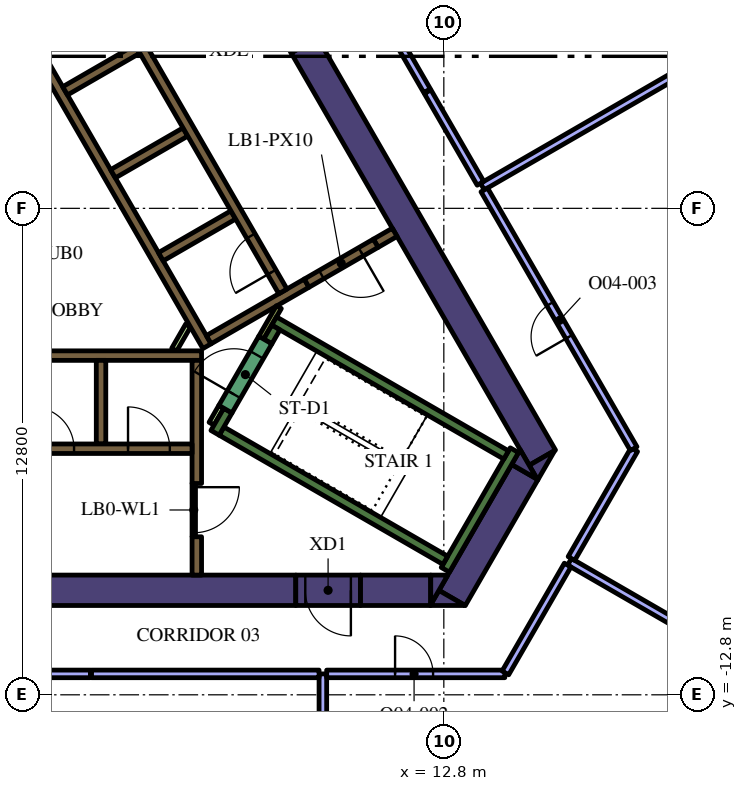
"""IFC4 building model, lengths in metres.
Left out: names, types, materials, properties, quantities, classifications, styles, units other than length and angle.
Written with IfcOpenShell. Run it as: python <this file> out.ifc"""

import sys

from ifc_helpers import new_model, si_unit, direction, frame, frame_2d, origin, place, context, subcontext, project, spatial, polyline, rectangle, outline, extrude, element, fill, save


model = new_model("IFC4")
c1 = context("Model", 3, precision=1e-05, world=origin(), true_north=direction((0.0, 1.0)))
c2 = subcontext(c1, "Body", "Model", "MODEL_VIEW")
j1 = project(units=[si_unit("LENGTHUNIT", "METRE"), si_unit("PLANEANGLEUNIT", "RADIAN")], contexts=[c1])
p1 = place(None, origin())
s1 = spatial("IfcSite", under=j1, at=p1, CompositionType="ELEMENT")
p2 = place(p1, origin())
s2 = spatial("IfcBuilding", under=s1, at=p2, CompositionType="ELEMENT")
p3 = place(p2, frame((0.0, 0.0, 187.8)))
s3 = spatial("IfcBuildingStorey", under=s2, at=p3, CompositionType="ELEMENT", Elevation=187.8)
p4 = place(p3, frame((9.129, 4.289, 0.0), z_axis=(0.0, 0.0, 1.0), x_axis=(0.499995742806, -0.866027861663, 0.0)))
e1 = element("IfcWall", 1, at=p4, inside=s3, PredefinedType="SOLIDWALL", context=c2, shape_type="SweptSolid", body=[
    extrude(rectangle(XDim=12.527, YDim=0.8, at=frame_2d((6.264, 0.0))), origin(), (0.0, 0.0, 1.0), 4.2),
])
p5 = place(p3, origin())
e2 = element("IfcWall", 2, at=p5, inside=s3, PredefinedType="SOLIDWALL", context=c2, shape_type="SweptSolid", body=[
    extrude(outline(polyline([(15.271, -7.15), (15.047, -6.762), (15.719, -6.374), (15.271, -7.15)])), origin(), (0.0, 0.0, 1.0), 4.2),
])
p6 = place(p3, frame((13.018, -10.252, 0.0), z_axis=(0.0, 0.0, 1.0), x_axis=(0.499984020225, 0.866034629516, 0.0)))
e3 = element("IfcWall", 3, at=p6, inside=s3, PredefinedType="SOLIDWALL", context=c2, shape_type="SweptSolid", body=[
    extrude(rectangle(XDim=3.824, YDim=0.8, at=frame_2d((1.912, 0.0))), origin(), (0.0, 0.0, 1.0), 4.2),
])
e4 = element("IfcWall", 4, at=p5, inside=s3, PredefinedType="SOLIDWALL", context=c2, shape_type="SweptSolid", body=[
    extrude(outline(polyline([(12.671, -10.053), (13.358, -10.45), (12.442, -10.45), (12.671, -10.053)])), origin(), (0.0, 0.0, 1.0), 4.2),
])
e5 = element("IfcWall", 5, at=p5, inside=s3, PredefinedType="SOLIDWALL", context=c2, shape_type="SweptSolid", body=[
    extrude(outline(polyline([(14.809, -6.35), (15.257, -7.126), (14.585, -6.738), (14.809, -6.35)])), origin(), (0.0, 0.0, 1.0), 4.2),
])
p7 = place(p3, frame((10.604, -10.05, 0.0), z_axis=(0.0, 0.0, 1.0), x_axis=(1.0, 0.0, 0.0)))
e6 = element("IfcWall", 6, at=p7, inside=s3, PredefinedType="SOLIDWALL", context=c2, shape_type="SweptSolid", body=[
    extrude(rectangle(XDim=1.849, YDim=0.8, at=frame_2d((0.925, 0.0))), origin(), (0.0, 0.0, 1.0), 4.2),
])
e7 = element("IfcWall", 7, at=p5, inside=s3, PredefinedType="SOLIDWALL", context=c2, shape_type="SweptSolid", body=[
    extrude(outline(polyline([(12.904, -9.65), (12.456, -10.426), (12.456, -9.65), (12.904, -9.65)])), origin(), (0.0, 0.0, 1.0), 4.2),
])
p8 = place(p3, frame((-13.378, -10.05, 0.0), z_axis=(0.0, 0.0, 1.0), x_axis=(1.0, 0.0, 0.0)))
e8 = element("IfcWall", 8, at=p8, inside=s3, PredefinedType="SOLIDWALL", context=c2, shape_type="SweptSolid", body=[
    extrude(rectangle(XDim=22.282, YDim=0.8, at=frame_2d((11.141, 0.0))), origin(), (0.0, 0.0, 1.0), 4.2),
])
p9 = place(p3, frame((12.84, -9.511, 0.0), z_axis=(0.0, 0.0, 1.0), x_axis=(0.499997733992, 0.866026712061, 0.0)))
e9 = element("IfcWall", 9, at=p9, inside=s3, PredefinedType="SOLIDWALL", context=c2, shape_type="SweptSolid", body=[
    extrude(rectangle(XDim=3.634, YDim=0.25, at=frame_2d((1.817, 0.0))), origin(), (0.0, 0.0, 1.0), 4.2),
])
p10 = place(p3, frame((12.84, -9.261, 0.0), z_axis=(0.0, 0.0, 1.0), x_axis=(-0.866013990052, 0.500019768644, 0.0)))
e10 = element("IfcWall", 10, at=p10, inside=s3, PredefinedType="SOLIDWALL", context=c2, shape_type="SweptSolid", body=[
    extrude(rectangle(XDim=6.8, YDim=0.25, at=frame_2d((3.4, 0.0))), origin(), (0.0, 0.0, 1.0), 4.2),
])
p11 = place(p3, frame((6.78, -5.906, 0.0), z_axis=(0.0, 0.0, 1.0), x_axis=(0.500223362819, 0.865896406789, 0.0)))
e11 = element("IfcWall", 11, at=p11, inside=s3, PredefinedType="SOLIDWALL", context=c2, shape_type="SweptSolid", body=[
    extrude(rectangle(XDim=0.675, YDim=0.25, at=frame_2d((0.337, 0.0))), origin(), (0.0, 0.0, 1.0), 4.2),
])
p12 = place(p3, frame((8.334, -2.964, 0.0), z_axis=(0.0, 0.0, 1.0), x_axis=(0.866016039709, -0.500016218704, 0.0)))
e12 = element("IfcWall", 12, at=p12, inside=s3, PredefinedType="SOLIDWALL", context=c2, shape_type="SweptSolid", body=[
    extrude(rectangle(XDim=7.05, YDim=0.25, at=frame_2d((3.525, 0.0))), origin(), (0.0, 0.0, 1.0), 4.2),
])
p13 = place(p3, frame((8.168, -3.503, 0.0), z_axis=(0.0, 0.0, 1.0), x_axis=(0.49972245349, 0.866185586049, 0.0)))
e13 = element("IfcWall", 13, at=p13, inside=s3, PredefinedType="SOLIDWALL", context=c2, shape_type="SweptSolid", body=[
    extrude(rectangle(XDim=0.425, YDim=0.25, at=frame_2d((0.212, 0.0))), origin(), (0.0, 0.0, 1.0), 4.2),
])
p14 = place(p3, frame((-5.545, -3.875, 0.0), z_axis=(0.0, 0.0, 1.0), x_axis=(1.0, 0.0, 0.0)))
e14 = element("IfcWall", 14, at=p14, inside=s3, PredefinedType="SOLIDWALL", context=c2, shape_type="SweptSolid", body=[
    extrude(rectangle(XDim=11.97, YDim=0.25, at=frame_2d((5.985, 0.0))), origin(), (0.0, 0.0, 1.0), 4.2),
])
p15 = place(p3, frame((6.3, -7.24, 0.0), z_axis=(0.0, 0.0, 1.0), x_axis=(0.0, 1.0, 0.0)))
e15 = element("IfcWall", 15, at=p15, inside=s3, PredefinedType="SOLIDWALL", context=c2, shape_type="SweptSolid", body=[
    extrude(rectangle(XDim=3.24, YDim=0.25, at=frame_2d((1.62, 0.0))), origin(), (0.0, 0.0, 1.0), 4.2),
])
p16 = place(p3, frame((6.3, -9.65, 0.0), z_axis=(0.0, 0.0, 1.0), x_axis=(0.0, 1.0, 0.0)))
e16 = element("IfcWall", 16, at=p16, inside=s3, PredefinedType="SOLIDWALL", context=c2, shape_type="SweptSolid", body=[
    extrude(rectangle(XDim=1.008, YDim=0.25, at=frame_2d((0.504, 0.0))), origin(), (0.0, 0.0, 1.0), 4.2),
])
p17 = place(p3, frame((3.78, -4.0, 0.0), z_axis=(0.0, 0.0, 1.0), x_axis=(0.0, -1.0, 0.0)))
e17 = element("IfcWall", 17, at=p17, inside=s3, PredefinedType="SOLIDWALL", context=c2, shape_type="SweptSolid", body=[
    extrude(rectangle(XDim=2.2, YDim=0.25, at=frame_2d((1.1, 0.0))), origin(), (0.0, 0.0, 1.0), 4.2),
])
p18 = place(p3, frame((11.507, -0.631, 0.0), z_axis=(0.0, 0.0, 1.0), x_axis=(-0.866093731455, -0.499881634324, 0.0)))
e18 = element("IfcWall", 18, at=p18, inside=s3, PredefinedType="SOLIDWALL", context=c2, shape_type="SweptSolid", body=[
    extrude(rectangle(XDim=0.575, YDim=0.25, at=frame_2d((0.288, 0.0))), origin(), (0.0, 0.0, 1.0), 4.2),
])
p19 = place(p3, frame((6.568, -3.627, 0.0), z_axis=(0.0, 0.0, 1.0), x_axis=(-0.499999455981, 0.866025717874, 0.0)))
e19 = element("IfcWall", 19, at=p19, inside=s3, PredefinedType="SOLIDWALL", context=c2, shape_type="SweptSolid", body=[
    extrude(rectangle(XDim=11.978, YDim=0.25, at=frame_2d((5.989, 0.0))), origin(), (0.0, 0.0, 1.0), 4.2),
])
for number, where, z_axis, x_axis in (
    (20, (2.834, 3.091, 0.0), (0.0, 0.0, 1.0), (0.866, 0.5, 0.0)),
    (21, (4.094, 0.909, 0.0), (0.0, 0.0, 1.0), (0.866, 0.5, 0.0)),
    (22, (5.354, -1.274, 0.0), (0.0, 0.0, 1.0), (0.866, 0.5, 0.0)),
):
    element("IfcWall", number, at=place(p3, frame(where, z_axis=z_axis, x_axis=x_axis)), inside=s3, PredefinedType="SOLIDWALL", context=c2, shape_type="SweptSolid", body=[
        extrude(rectangle(XDim=2.2, YDim=0.25, at=frame_2d((1.1, 0.0))), origin(), (0.0, 0.0, 1.0), 4.2),
    ])
p20 = place(p3, frame((6.614, -3.456, 0.0), z_axis=(0.0, 0.0, 1.0), x_axis=(0.866032512851, 0.499987686533, 0.0)))
e23 = element("IfcWall", 23, at=p20, inside=s3, PredefinedType="SOLIDWALL", context=c2, shape_type="SweptSolid", body=[
    extrude(rectangle(XDim=2.975, YDim=0.25, at=frame_2d((1.487, 0.0))), origin(), (0.0, 0.0, 1.0), 4.2),
])
p21 = place(p3, frame((6.945, -5.222, 0.0), z_axis=(0.0, 0.0, 1.0), x_axis=(-0.499818422106, -0.866130212453, 0.0)))
e24 = element("IfcWall", 24, at=p21, inside=s3, PredefinedType="PARTITIONING", context=c2, shape_type="SweptSolid", body=[
    extrude(rectangle(XDim=0.514, YDim=0.15, at=frame_2d((0.257, 0.0))), origin(), (0.0, 0.0, 1.0), 3.15),
])
p22 = place(p3, frame((8.459, -2.599, 0.0), z_axis=(0.0, 0.0, 1.0), x_axis=(-0.500041054325, -0.866001699761, 0.0)))
e25 = element("IfcWall", 25, at=p22, inside=s3, PredefinedType="PARTITIONING", context=c2, shape_type="SweptSolid", body=[
    extrude(rectangle(XDim=0.929, YDim=0.15, at=frame_2d((0.464, 0.0))), origin(), (0.0, 0.0, 1.0), 4.2),
])
p23 = place(p3, frame((5.705, -3.718, 0.0), z_axis=(0.0, 0.0, 1.0), x_axis=(0.499962090823, 0.866047289552, 0.0)))
e26 = element("IfcWall", 26, at=p23, inside=s3, PredefinedType="PARTITIONING", context=c2, shape_type="SweptSolid", body=[
    extrude(rectangle(XDim=0.735, YDim=0.15, at=frame_2d((0.367, 0.0))), origin(), (0.0, 0.0, 1.0), 3.15),
])
p24 = place(p3, frame((-6.175, -6.325, 0.0), z_axis=(0.0, 0.0, 1.0), x_axis=(1.0, 0.0, 0.0)))
e27 = element("IfcWall", 27, at=p24, inside=s3, PredefinedType="SOLIDWALL", context=c2, shape_type="SweptSolid", body=[
    extrude(rectangle(XDim=12.35, YDim=0.25, at=frame_2d((6.175, 0.0))), origin(), (0.0, 0.0, 1.0), 4.2),
])
p25 = place(p24, frame((0.585, 0.0, 0.0)))
e28 = element("IfcOpeningElement", 28, at=p25, cuts=e27, PredefinedType="OPENING", context=c2, shape_type="SweptSolid", body=[
    extrude(rectangle(XDim=1.1, YDim=2.1, at=frame_2d((0.55, 1.05))), frame((0.0, 0.135, 0.0), z_axis=(0.0, -1.0, 0.0), x_axis=(1.0, 0.0, 0.0)), (0.0, 0.0, 1.0), 0.27),
])
p26 = place(p24, frame((3.105, 0.0, 0.0)))
e29 = element("IfcOpeningElement", 29, at=p26, cuts=e27, PredefinedType="OPENING", context=c2, shape_type="SweptSolid", body=[
    extrude(rectangle(XDim=1.1, YDim=2.1, at=frame_2d((0.55, 1.05))), frame((0.0, 0.135, 0.0), z_axis=(0.0, -1.0, 0.0), x_axis=(1.0, 0.0, 0.0)), (0.0, 0.0, 1.0), 0.27),
])
p27 = place(p24, frame((5.625, 0.0, 0.0)))
e30 = element("IfcOpeningElement", 30, at=p27, cuts=e27, PredefinedType="OPENING", context=c2, shape_type="SweptSolid", body=[
    extrude(rectangle(XDim=1.1, YDim=2.1, at=frame_2d((0.55, 1.05))), frame((0.0, 0.135, 0.0), z_axis=(0.0, -1.0, 0.0), x_axis=(1.0, 0.0, 0.0)), (0.0, 0.0, 1.0), 0.27),
])
p28 = place(p24, frame((8.145, 0.0, 0.0)))
e31 = element("IfcOpeningElement", 31, at=p28, cuts=e27, PredefinedType="OPENING", context=c2, shape_type="SweptSolid", body=[
    extrude(rectangle(XDim=1.1, YDim=2.1, at=frame_2d((0.55, 1.05))), frame((0.0, 0.135, 0.0), z_axis=(0.0, -1.0, 0.0), x_axis=(1.0, 0.0, 0.0)), (0.0, 0.0, 1.0), 0.27),
])
p29 = place(p24, frame((10.665, 0.0, 0.0)))
e32 = element("IfcOpeningElement", 32, at=p29, cuts=e27, PredefinedType="OPENING", context=c2, shape_type="SweptSolid", body=[
    extrude(rectangle(XDim=1.1, YDim=2.1, at=frame_2d((0.55, 1.05))), frame((0.0, 0.135, 0.0), z_axis=(0.0, -1.0, 0.0), x_axis=(1.0, 0.0, 0.0)), (0.0, 0.0, 1.0), 0.27),
])
p30 = place(p3, frame((8.565, -2.185, 0.0), z_axis=(0.0, 0.0, 1.0), x_axis=(-0.499997954832, 0.866026584559, 0.0)))
e33 = element("IfcWall", 33, at=p30, inside=s3, PredefinedType="SOLIDWALL", context=c2, shape_type="SweptSolid", body=[
    extrude(rectangle(XDim=12.35, YDim=0.25, at=frame_2d((6.175, 0.0))), origin(), (0.0, 0.0, 1.0), 4.2),
])
p31 = place(p30, frame((0.585, 0.0, 0.0)))
e34 = element("IfcOpeningElement", 34, at=p31, cuts=e33, PredefinedType="OPENING", context=c2, shape_type="SweptSolid", body=[
    extrude(rectangle(XDim=1.1, YDim=2.1, at=frame_2d((0.55, 1.05))), frame((0.0, 0.135, 0.0), z_axis=(0.0, -1.0, 0.0), x_axis=(1.0, 0.0, 0.0)), (0.0, 0.0, 1.0), 0.27),
])
p32 = place(p3, frame((7.053, -5.284, 0.0), z_axis=(0.0, 0.0, 1.0), x_axis=(0.500078061341, 0.865980330357, 0.0)))
e35 = element("IfcWall", 35, at=p32, inside=s3, PredefinedType="SOLIDWALL", context=c2, shape_type="SweptSolid", body=[
    extrude(rectangle(XDim=2.1, YDim=0.4, at=frame_2d((1.05, 0.0))), origin(), (0.0, 0.0, 1.0), 4.2),
])
p33 = place(p32, frame((0.45, 0.0, 0.0)))
e36 = element("IfcOpeningElement", 36, at=p33, cuts=e35, PredefinedType="OPENING", context=c2, shape_type="SweptSolid", body=[
    extrude(rectangle(XDim=1.2, YDim=2.1, at=frame_2d((0.6, 1.05))), frame((0.0, 0.21, 0.0), z_axis=(0.0, -1.0, 0.0), x_axis=(1.0, 0.0, 0.0)), (0.0, 0.0, 1.0), 0.42),
])
p34 = place(p3, frame((6.22, -7.237, 0.0), z_axis=(0.0, 0.0, 1.0), x_axis=(0.0, -1.0, 0.0)))
e37 = element("IfcWall", 37, at=p34, inside=s3, PredefinedType="PARTITIONING", context=c2, shape_type="SweptSolid", body=[
    extrude(rectangle(XDim=1.4, YDim=0.09, at=frame_2d((0.7, 0.0))), origin(), (0.0, 0.0, 1.0), 3.15),
])
p35 = place(p34, frame((0.1, 0.0, 0.0)))
e38 = element("IfcOpeningElement", 38, at=p35, cuts=e37, PredefinedType="OPENING", context=c2, shape_type="SweptSolid", body=[
    extrude(rectangle(XDim=1.2, YDim=2.1, at=frame_2d((0.6, 1.05))), frame((0.0, 0.055, 0.0), z_axis=(0.0, -1.0, 0.0), x_axis=(1.0, 0.0, 0.0)), (0.0, 0.0, 1.0), 0.11),
])
p36 = place(p3, frame((11.009, -0.919, 0.0), z_axis=(0.0, 0.0, 1.0), x_axis=(-0.866059744384, -0.49994051562, 0.0)))
e39 = element("IfcWall", 39, at=p36, inside=s3, PredefinedType="SOLIDWALL", context=c2, shape_type="SweptSolid", body=[
    extrude(rectangle(XDim=2.1, YDim=0.25, at=frame_2d((1.05, 0.0))), origin(), (0.0, 0.0, 1.0), 4.2),
])
p37 = place(p36, frame((0.45, 0.0, 0.0)))
e40 = element("IfcOpeningElement", 40, at=p37, cuts=e39, PredefinedType="OPENING", context=c2, shape_type="SweptSolid", body=[
    extrude(rectangle(XDim=1.2, YDim=2.1, at=frame_2d((0.6, 1.05))), frame((0.0, 0.135, 0.0), z_axis=(0.0, -1.0, 0.0), x_axis=(1.0, 0.0, 0.0)), (0.0, 0.0, 1.0), 0.27),
])
p38 = place(p3, frame((10.604, -10.05, 0.0), z_axis=(0.0, 0.0, 1.0), x_axis=(-1.0, 0.0, 0.0)))
e41 = element("IfcWall", 41, at=p38, inside=s3, PredefinedType="SOLIDWALL", context=c2, shape_type="SweptSolid", body=[
    extrude(rectangle(XDim=1.7, YDim=0.8, at=frame_2d((0.85, 0.0))), origin(), (0.0, 0.0, 1.0), 4.2),
])
p39 = place(p38, frame((0.25, 0.0, 0.0)))
e42 = element("IfcOpeningElement", 42, at=p39, cuts=e41, PredefinedType="OPENING", context=c2, shape_type="SweptSolid", body=[
    extrude(rectangle(XDim=1.2, YDim=2.1, at=frame_2d((0.6, 1.05))), frame((0.0, 0.41, 0.0), z_axis=(0.0, -1.0, 0.0), x_axis=(1.0, 0.0, 0.0)), (0.0, 0.0, 1.0), 0.82),
])
p40 = place(p3, frame((8.279, 5.761, 0.0), z_axis=(0.0, 0.0, 1.0), x_axis=(0.500062241894, -0.865989465428, 0.0)))
e43 = element("IfcWall", 43, at=p40, inside=s3, PredefinedType="SOLIDWALL", context=c2, shape_type="SweptSolid", body=[
    extrude(rectangle(XDim=1.7, YDim=0.8, at=frame_2d((0.85, 0.0))), origin(), (0.0, 0.0, 1.0), 4.2),
])
p41 = place(p40, frame((0.25, 0.0, 0.0)))
e44 = element("IfcOpeningElement", 44, at=p41, cuts=e43, PredefinedType="OPENING", context=c2, shape_type="SweptSolid", body=[
    extrude(rectangle(XDim=1.2, YDim=2.1, at=frame_2d((0.6, 1.05))), frame((0.0, 0.41, 0.0), z_axis=(0.0, -1.0, 0.0), x_axis=(1.0, 0.0, 0.0)), (0.0, 0.0, 1.0), 0.82),
])
p42 = place(p3, frame((9.617, -12.25, 0.0), z_axis=(0.0, 0.0, 1.0), x_axis=(0.0, -1.0, 0.0)))
e45 = element("IfcWall", 45, at=p42, inside=s3, PredefinedType="PARTITIONING", context=c2, shape_type="SweptSolid", body=[
    extrude(rectangle(XDim=7.761, YDim=0.2, at=frame_2d((3.881, 0.0))), origin(), (0.0, 0.0, 1.0), 3.15),
])
p43 = place(p3, frame((-3.5, -12.25, 0.0), z_axis=(0.0, 0.0, 1.0), x_axis=(1.0, 0.0, 0.0)))
e46 = element("IfcWall", 46, at=p43, inside=s3, PredefinedType="PARTITIONING", context=c2, shape_type="SweptSolid", body=[
    extrude(rectangle(XDim=7.0, YDim=0.2, at=frame_2d((3.5, 0.0))), origin(), (0.0, 0.0, 1.0), 3.15),
])
p44 = place(p43, frame((3.0, 0.0, 0.0)))
e47 = element("IfcOpeningElement", 47, at=p44, cuts=e46, PredefinedType="OPENING", context=c2, shape_type="SweptSolid", body=[
    extrude(rectangle(XDim=1.0, YDim=2.1, at=frame_2d((0.5, 1.05))), frame((0.0, 0.11, 0.0), z_axis=(0.0, -1.0, 0.0), x_axis=(1.0, 0.0, 0.0)), (0.0, 0.0, 1.0), 0.22),
])
p45 = place(p3, frame((3.53, -12.25, 0.0), z_axis=(0.0, 0.0, 1.0), x_axis=(1.0, 0.0, 0.0)))
e48 = element("IfcWall", 48, at=p45, inside=s3, PredefinedType="PARTITIONING", context=c2, shape_type="SweptSolid", body=[
    extrude(rectangle(XDim=5.987, YDim=0.2, at=frame_2d((2.994, 0.0))), origin(), (0.0, 0.0, 1.0), 3.15),
])
p46 = place(p3, frame((16.108, -9.3, 0.0), z_axis=(0.0, 0.0, 1.0), x_axis=(0.866027180319, -0.499996922939, 0.0)))
e49 = element("IfcWall", 49, at=p46, inside=s3, PredefinedType="PARTITIONING", context=c2, shape_type="SweptSolid", body=[
    extrude(rectangle(XDim=10.754, YDim=0.2, at=frame_2d((5.377, 0.0))), origin(), (0.0, 0.0, 1.0), 3.15),
])
p47 = place(p3, frame((9.717, -12.25, 0.0), z_axis=(0.0, 0.0, 1.0), x_axis=(1.0, 0.0, 0.0)))
e50 = element("IfcWall", 50, at=p47, inside=s3, PredefinedType="PARTITIONING", context=c2, shape_type="SweptSolid", body=[
    extrude(rectangle(XDim=4.688, YDim=0.2, at=frame_2d((2.344, 0.0))), origin(), (0.0, 0.0, 1.0), 3.15),
])
p48 = place(p47, frame((1.8, 0.0, 0.0)))
e51 = element("IfcOpeningElement", 51, at=p48, cuts=e50, PredefinedType="OPENING", context=c2, shape_type="SweptSolid", body=[
    extrude(rectangle(XDim=1.0, YDim=2.1, at=frame_2d((0.5, 1.05))), frame((0.0, 0.11, 0.0), z_axis=(0.0, -1.0, 0.0), x_axis=(1.0, 0.0, 0.0)), (0.0, 0.0, 1.0), 0.22),
])
p49 = place(p3, frame((14.42, -12.224, 0.0), z_axis=(0.0, 0.0, 1.0), x_axis=(0.500001965626, 0.866024268927, 0.0)))
e52 = element("IfcWall", 52, at=p49, inside=s3, PredefinedType="PARTITIONING", context=c2, shape_type="SweptSolid", body=[
    extrude(rectangle(XDim=3.276, YDim=0.2, at=frame_2d((1.638, 0.0))), origin(), (0.0, 0.0, 1.0), 3.15),
])
p50 = place(p3, frame((13.815, 0.572, 0.0), z_axis=(0.0, 0.0, 1.0), x_axis=(0.866036391575, 0.499980968105, 0.0)))
e53 = element("IfcWall", 53, at=p50, inside=s3, PredefinedType="PARTITIONING", context=c2, shape_type="SweptSolid", body=[
    extrude(rectangle(XDim=8.42, YDim=0.2, at=frame_2d((4.21, 0.0))), origin(), (0.0, 0.0, 1.0), 3.15),
])
p51 = place(p3, frame((16.158, -9.213, 0.0), z_axis=(0.0, 0.0, 1.0), x_axis=(0.499990919662, 0.866030646256, 0.0)))
e54 = element("IfcWall", 54, at=p51, inside=s3, PredefinedType="PARTITIONING", context=c2, shape_type="SweptSolid", body=[
    extrude(rectangle(XDim=3.306, YDim=0.2, at=frame_2d((1.653, 0.0))), origin(), (0.0, 0.0, 1.0), 3.15),
])
p52 = place(p3, frame((17.796, -6.324, 0.0), z_axis=(0.0, 0.0, 1.0), x_axis=(-0.500026166427, 0.866010296064, 0.0)))
e55 = element("IfcWall", 55, at=p52, inside=s3, PredefinedType="PARTITIONING", context=c2, shape_type="SweptSolid", body=[
    extrude(rectangle(XDim=7.863, YDim=0.2, at=frame_2d((3.931, 0.0))), origin(), (0.0, 0.0, 1.0), 3.15),
])
p53 = place(p52, frame((3.4, 0.0, 0.0)))
e56 = element("IfcOpeningElement", 56, at=p53, cuts=e55, PredefinedType="OPENING", context=c2, shape_type="SweptSolid", body=[
    extrude(rectangle(XDim=1.0, YDim=2.1, at=frame_2d((0.5, 1.05))), frame((0.0, 0.11, 0.0), z_axis=(0.0, -1.0, 0.0), x_axis=(1.0, 0.0, 0.0)), (0.0, 0.0, 1.0), 0.22),
])
p54 = place(p3, frame((12.359, 3.094, 0.0), z_axis=(0.0, 0.0, 1.0), x_axis=(-0.500010275428, 0.866019471182, 0.0)))
e57 = element("IfcWall", 57, at=p54, inside=s3, PredefinedType="PARTITIONING", context=c2, shape_type="SweptSolid", body=[
    extrude(rectangle(XDim=7.0, YDim=0.2, at=frame_2d((3.5, 0.0))), origin(), (0.0, 0.0, 1.0), 3.15),
])
p55 = place(p3, frame((13.765, 0.659, 0.0), z_axis=(0.0, 0.0, 1.0), x_axis=(-0.500046568876, 0.865998515562, 0.0)))
e58 = element("IfcWall", 58, at=p55, inside=s3, PredefinedType="PARTITIONING", context=c2, shape_type="SweptSolid", body=[
    extrude(rectangle(XDim=2.782, YDim=0.2, at=frame_2d((1.391, 0.0))), origin(), (0.0, 0.0, 1.0), 3.15),
])
p56 = place(p28, origin())
e59 = element("IfcDoor", 59, at=p56, inside=s3, OperationType="DOUBLE_DOOR_SLIDING", PredefinedType="DOOR", context=c2, shape_type="SweptSolid", body=[
    extrude(rectangle(XDim=1.1, YDim=2.1, at=frame_2d((0.55, 1.05))), frame((0.0, 0.025, 0.0), z_axis=(0.0, -1.0, 0.0), x_axis=(1.0, 0.0, 0.0)), (0.0, 0.0, 1.0), 0.05),
])
fill(e31, e59)
p57 = place(p29, origin())
e60 = element("IfcDoor", 60, at=p57, inside=s3, OperationType="DOUBLE_DOOR_SLIDING", PredefinedType="DOOR", context=c2, shape_type="SweptSolid", body=[
    extrude(rectangle(XDim=1.1, YDim=2.1, at=frame_2d((0.55, 1.05))), frame((0.0, 0.025, 0.0), z_axis=(0.0, -1.0, 0.0), x_axis=(1.0, 0.0, 0.0)), (0.0, 0.0, 1.0), 0.05),
])
fill(e32, e60)
p58 = place(p31, origin())
e61 = element("IfcDoor", 61, at=p58, inside=s3, OperationType="DOUBLE_DOOR_SLIDING", PredefinedType="DOOR", context=c2, shape_type="SweptSolid", body=[
    extrude(rectangle(XDim=1.1, YDim=2.1, at=frame_2d((0.55, 1.05))), frame((0.0, 0.025, 0.0), z_axis=(0.0, -1.0, 0.0), x_axis=(1.0, 0.0, 0.0)), (0.0, 0.0, 1.0), 0.05),
])
fill(e34, e61)
p59 = place(p33, origin())
e62 = element("IfcDoor", 62, at=p59, inside=s3, OperationType="SINGLE_SWING_LEFT", PredefinedType="DOOR", context=c2, shape_type="SweptSolid", body=[
    extrude(rectangle(XDim=1.2, YDim=2.1, at=frame_2d((0.6, 1.05))), frame((0.0, 0.025, 0.0), z_axis=(0.0, -1.0, 0.0), x_axis=(1.0, 0.0, 0.0)), (0.0, 0.0, 1.0), 0.05),
])
fill(e36, e62)
p60 = place(p35, origin())
e63 = element("IfcDoor", 63, at=p60, inside=s3, OperationType="SINGLE_SWING_LEFT", PredefinedType="DOOR", context=c2, shape_type="SweptSolid", body=[
    extrude(rectangle(XDim=1.2, YDim=2.1, at=frame_2d((0.6, 1.05))), frame((0.0, 0.025, 0.0), z_axis=(0.0, -1.0, 0.0), x_axis=(1.0, 0.0, 0.0)), (0.0, 0.0, 1.0), 0.05),
])
fill(e38, e63)
p61 = place(p37, origin())
e64 = element("IfcDoor", 64, at=p61, inside=s3, OperationType="SINGLE_SWING_LEFT", PredefinedType="DOOR", context=c2, shape_type="SweptSolid", body=[
    extrude(rectangle(XDim=1.2, YDim=2.1, at=frame_2d((0.6, 1.05))), frame((0.0, 0.025, 0.0), z_axis=(0.0, -1.0, 0.0), x_axis=(1.0, 0.0, 0.0)), (0.0, 0.0, 1.0), 0.05),
])
fill(e40, e64)
p62 = place(p39, origin())
e65 = element("IfcDoor", 65, at=p62, inside=s3, OperationType="SINGLE_SWING_LEFT", PredefinedType="DOOR", context=c2, shape_type="SweptSolid", body=[
    extrude(rectangle(XDim=1.2, YDim=2.1, at=frame_2d((0.6, 1.05))), frame((0.0, 0.025, 0.0), z_axis=(0.0, -1.0, 0.0), x_axis=(1.0, 0.0, 0.0)), (0.0, 0.0, 1.0), 0.05),
])
fill(e42, e65)
p63 = place(p48, origin())
e66 = element("IfcDoor", 66, at=p63, inside=s3, OperationType="SINGLE_SWING_LEFT", PredefinedType="DOOR", context=c2, shape_type="SweptSolid", body=[
    extrude(rectangle(XDim=1.0, YDim=2.1, at=frame_2d((0.5, 1.05))), frame((0.0, 0.025, 0.0), z_axis=(0.0, -1.0, 0.0), x_axis=(1.0, 0.0, 0.0)), (0.0, 0.0, 1.0), 0.05),
])
fill(e51, e66)
p64 = place(p53, origin())
e67 = element("IfcDoor", 67, at=p64, inside=s3, OperationType="SINGLE_SWING_LEFT", PredefinedType="DOOR", context=c2, shape_type="SweptSolid", body=[
    extrude(rectangle(XDim=1.0, YDim=2.1, at=frame_2d((0.5, 1.05))), frame((0.0, 0.025, 0.0), z_axis=(0.0, -1.0, 0.0), x_axis=(1.0, 0.0, 0.0)), (0.0, 0.0, 1.0), 0.05),
])
fill(e56, e67)
save(model, sys.argv[1])
